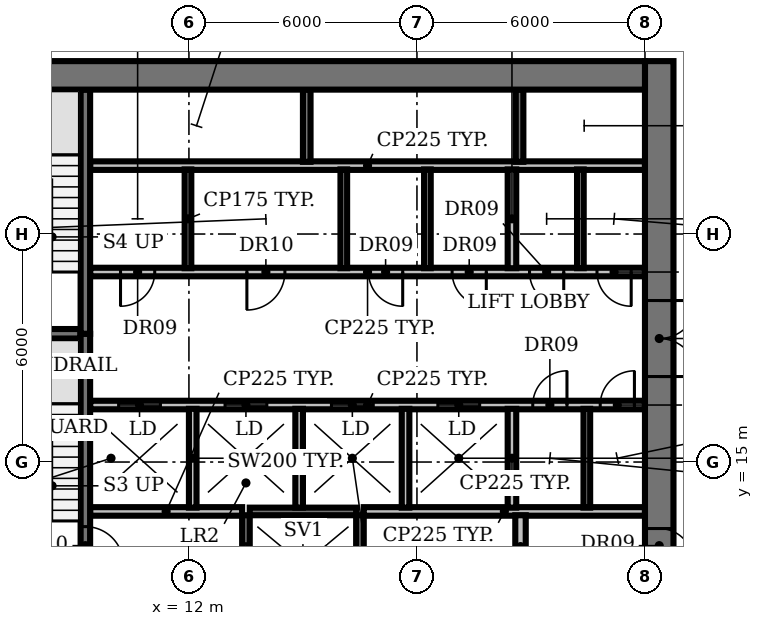
"""IFC4 building model, lengths in metres.
Left out: names, types, materials, properties, quantities, classifications, styles, units other than length and angle.
Written with IfcOpenShell. Run it as: python <this file> out.ifc"""

import sys

from ifc_helpers import new_model, si_unit, direction, frame, frame_2d, origin, place, context, subcontext, project, spatial, rectangle, extrude, element, fill, save


model = new_model("IFC4")
c1 = context("Model", 3, precision=1e-05, world=origin(), true_north=direction((0.0, 1.0)))
c2 = subcontext(c1, "Body", "Model", "MODEL_VIEW")
j1 = project(units=[si_unit("LENGTHUNIT", "METRE"), si_unit("PLANEANGLEUNIT", "RADIAN")], contexts=[c1])
p1 = place(None, origin())
s1 = spatial("IfcSite", under=j1, at=p1, CompositionType="ELEMENT")
p2 = place(p1, origin())
s2 = spatial("IfcBuilding", under=s1, at=p2, CompositionType="ELEMENT")
p3 = place(p2, frame((0.0, 0.0, 100.4)))
s3 = spatial("IfcBuildingStorey", under=s2, at=p3, CompositionType="ELEMENT", Elevation=100.4)
p4 = place(p3, frame((9.4, 13.7, 0.0), z_axis=(0.0, 0.0, 1.0), x_axis=(1.0, 0.0, 0.0)))
e1 = element("IfcWall", 1, at=p4, inside=s3, PredefinedType="PARTITIONING", context=c2, shape_type="SweptSolid", body=[
    extrude(rectangle(XDim=4.0, YDim=0.225, at=frame_2d((2.0, 0.0))), origin(), (0.0, 0.0, 1.0), 3.85),
])
p5 = place(p3, frame((13.6, 13.7, 0.0), z_axis=(0.0, 0.0, 1.0), x_axis=(1.0, 0.0, 0.0)))
e2 = element("IfcWall", 2, at=p5, inside=s3, PredefinedType="SHEAR", context=c2, shape_type="SweptSolid", body=[
    extrude(rectangle(XDim=2.8, YDim=0.2, at=frame_2d((1.4, 0.0))), origin(), (0.0, 0.0, 1.0), 3.85),
])
p6 = place(p3, frame((16.6, 13.7, 0.0), z_axis=(0.0, 0.0, 1.0), x_axis=(1.0, 0.0, 0.0)))
e3 = element("IfcWall", 3, at=p6, inside=s3, PredefinedType="PARTITIONING", context=c2, shape_type="SweptSolid", body=[
    extrude(rectangle(XDim=7.4, YDim=0.225, at=frame_2d((3.7, 0.0))), origin(), (0.0, 0.0, 1.0), 3.85),
])
p7 = place(p3, frame((9.4, 16.5, 0.0), z_axis=(0.0, 0.0, 1.0), x_axis=(1.0, 0.0, 0.0)))
e4 = element("IfcWall", 4, at=p7, inside=s3, PredefinedType="PARTITIONING", context=c2, shape_type="SweptSolid", body=[
    extrude(rectangle(XDim=14.6, YDim=0.225, at=frame_2d((7.3, 0.0))), origin(), (0.0, 0.0, 1.0), 3.85),
])
p8 = place(p7, frame((0.75, 0.0, 0.0)))
e5 = element("IfcOpeningElement", 5, at=p8, cuts=e4, PredefinedType="OPENING", context=c2, shape_type="SweptSolid", body=[
    extrude(rectangle(XDim=1.1, YDim=2.1, at=frame_2d((0.55, 1.05))), frame((0.0, 0.123, 0.0), z_axis=(0.0, -1.0, 0.0), x_axis=(1.0, 0.0, 0.0)), (0.0, 0.0, 1.0), 0.245),
])
p9 = place(p7, frame((3.55, 0.0, 0.0)))
e6 = element("IfcOpeningElement", 6, at=p9, cuts=e4, PredefinedType="OPENING", context=c2, shape_type="SweptSolid", body=[
    extrude(rectangle(XDim=1.1, YDim=2.1, at=frame_2d((0.55, 1.05))), frame((0.0, 0.123, 0.0), z_axis=(0.0, -1.0, 0.0), x_axis=(1.0, 0.0, 0.0)), (0.0, 0.0, 1.0), 0.245),
])
p10 = place(p7, frame((6.35, 0.0, 0.0)))
e7 = element("IfcOpeningElement", 7, at=p10, cuts=e4, PredefinedType="OPENING", context=c2, shape_type="SweptSolid", body=[
    extrude(rectangle(XDim=1.1, YDim=2.1, at=frame_2d((0.55, 1.05))), frame((0.0, 0.123, 0.0), z_axis=(0.0, -1.0, 0.0), x_axis=(1.0, 0.0, 0.0)), (0.0, 0.0, 1.0), 0.245),
])
p11 = place(p7, frame((9.15, 0.0, 0.0)))
e8 = element("IfcOpeningElement", 8, at=p11, cuts=e4, PredefinedType="OPENING", context=c2, shape_type="SweptSolid", body=[
    extrude(rectangle(XDim=1.1, YDim=2.1, at=frame_2d((0.55, 1.05))), frame((0.0, 0.123, 0.0), z_axis=(0.0, -1.0, 0.0), x_axis=(1.0, 0.0, 0.0)), (0.0, 0.0, 1.0), 0.245),
])
p12 = place(p7, frame((11.647, 0.0, 0.0)))
e9 = element("IfcOpeningElement", 9, at=p12, cuts=e4, PredefinedType="OPENING", context=c2, shape_type="SweptSolid", body=[
    extrude(rectangle(XDim=0.9, YDim=2.1, at=frame_2d((0.45, 1.05))), frame((0.0, 0.123, 0.0), z_axis=(0.0, -1.0, 0.0), x_axis=(1.0, 0.0, 0.0)), (0.0, 0.0, 1.0), 0.245),
])
p13 = place(p7, frame((13.423, 0.0, 0.0)))
e10 = element("IfcOpeningElement", 10, at=p13, cuts=e4, PredefinedType="OPENING", context=c2, shape_type="SweptSolid", body=[
    extrude(rectangle(XDim=0.9, YDim=2.1, at=frame_2d((0.45, 1.05))), frame((0.0, 0.123, 0.0), z_axis=(0.0, -1.0, 0.0), x_axis=(1.0, 0.0, 0.0)), (0.0, 0.0, 1.0), 0.245),
])
p14 = place(p3, frame((6.0, 18.375, 0.0), z_axis=(0.0, 0.0, 1.0), x_axis=(1.0, 0.0, 0.0)))
e11 = element("IfcWall", 11, at=p14, inside=s3, PredefinedType="SHEAR", context=c2, shape_type="SweptSolid", body=[
    extrude(rectangle(XDim=3.15, YDim=0.25, at=frame_2d((1.575, 0.0))), origin(), (0.0, 0.0, 1.0), 3.85),
])
p15 = place(p3, frame((24.0, 20.0, 0.0), z_axis=(0.0, 0.0, 1.0), x_axis=(-1.0, 0.0, 0.0)))
e12 = element("IfcWall", 12, at=p15, inside=s3, PredefinedType="PARTITIONING", context=c2, shape_type="SweptSolid", body=[
    extrude(rectangle(XDim=14.6, YDim=0.225, at=frame_2d((7.3, 0.0))), origin(), (0.0, 0.0, 1.0), 3.85),
])
p16 = place(p15, frame((12.9, 0.0, 0.0)))
e13 = element("IfcOpeningElement", 13, at=p16, cuts=e12, PredefinedType="OPENING", context=c2, shape_type="SweptSolid", body=[
    extrude(rectangle(XDim=0.9, YDim=2.1, at=frame_2d((0.45, 1.05))), frame((0.0, 0.123, 0.0), z_axis=(0.0, -1.0, 0.0), x_axis=(1.0, 0.0, 0.0)), (0.0, 0.0, 1.0), 0.245),
])
p17 = place(p15, frame((9.475, 0.0, 0.0)))
e14 = element("IfcOpeningElement", 14, at=p17, cuts=e12, PredefinedType="OPENING", context=c2, shape_type="SweptSolid", body=[
    extrude(rectangle(XDim=1.0, YDim=2.1, at=frame_2d((0.5, 1.05))), frame((0.0, 0.123, 0.0), z_axis=(0.0, -1.0, 0.0), x_axis=(1.0, 0.0, 0.0)), (0.0, 0.0, 1.0), 0.245),
])
p18 = place(p15, frame((6.375, 0.0, 0.0)))
e15 = element("IfcOpeningElement", 15, at=p18, cuts=e12, PredefinedType="OPENING", context=c2, shape_type="SweptSolid", body=[
    extrude(rectangle(XDim=0.9, YDim=2.1, at=frame_2d((0.45, 1.05))), frame((0.0, 0.123, 0.0), z_axis=(0.0, -1.0, 0.0), x_axis=(1.0, 0.0, 0.0)), (0.0, 0.0, 1.0), 0.245),
])
p19 = place(p15, frame((4.175, 0.0, 0.0)))
e16 = element("IfcOpeningElement", 16, at=p19, cuts=e12, PredefinedType="OPENING", context=c2, shape_type="SweptSolid", body=[
    extrude(rectangle(XDim=0.9, YDim=2.1, at=frame_2d((0.45, 1.05))), frame((0.0, 0.123, 0.0), z_axis=(0.0, -1.0, 0.0), x_axis=(1.0, 0.0, 0.0)), (0.0, 0.0, 1.0), 0.245),
])
p20 = place(p15, frame((2.137, 0.0, 0.0)))
e17 = element("IfcOpeningElement", 17, at=p20, cuts=e12, PredefinedType="OPENING", context=c2, shape_type="SweptSolid", body=[
    extrude(rectangle(XDim=0.9, YDim=2.1, at=frame_2d((0.45, 1.05))), frame((0.0, 0.123, 0.0), z_axis=(0.0, -1.0, 0.0), x_axis=(1.0, 0.0, 0.0)), (0.0, 0.0, 1.0), 0.245),
])
p21 = place(p15, frame((0.363, 0.0, 0.0)))
e18 = element("IfcOpeningElement", 18, at=p21, cuts=e12, PredefinedType="OPENING", context=c2, shape_type="SweptSolid", body=[
    extrude(rectangle(XDim=0.9, YDim=2.1, at=frame_2d((0.45, 1.05))), frame((0.0, 0.123, 0.0), z_axis=(0.0, -1.0, 0.0), x_axis=(1.0, 0.0, 0.0)), (0.0, 0.0, 1.0), 0.245),
])
p22 = place(p3, frame((9.4, 22.8, 0.0), z_axis=(0.0, 0.0, 1.0), x_axis=(1.0, 0.0, 0.0)))
e19 = element("IfcWall", 19, at=p22, inside=s3, PredefinedType="PARTITIONING", context=c2, shape_type="SweptSolid", body=[
    extrude(rectangle(XDim=14.6, YDim=0.225, at=frame_2d((7.3, 0.0))), origin(), (0.0, 0.0, 1.0), 3.85),
])
p23 = place(p3, frame((9.275, 18.375, 0.0), z_axis=(0.0, 0.0, 1.0), x_axis=(0.0, -1.0, 0.0)))
e20 = element("IfcWall", 20, at=p23, inside=s3, PredefinedType="SHEAR", context=c2, shape_type="SweptSolid", body=[
    extrude(rectangle(XDim=6.55, YDim=0.25, at=frame_2d((3.275, 0.0))), origin(), (0.0, 0.0, 1.0), 3.85),
])
p24 = place(p23, frame((5.075, 0.0, 0.0)))
e21 = element("IfcOpeningElement", 21, at=p24, cuts=e20, PredefinedType="OPENING", context=c2, shape_type="SweptSolid", body=[
    extrude(rectangle(XDim=1.0, YDim=2.1, at=frame_2d((0.5, 1.05))), frame((0.0, 0.135, 0.0), z_axis=(0.0, -1.0, 0.0), x_axis=(1.0, 0.0, 0.0)), (0.0, 0.0, 1.0), 0.27),
])
p25 = place(p3, frame((9.275, 18.375, 0.0), z_axis=(0.0, 0.0, 1.0), x_axis=(0.0, 1.0, 0.0)))
e22 = element("IfcWall", 22, at=p25, inside=s3, PredefinedType="SHEAR", context=c2, shape_type="SweptSolid", body=[
    extrude(rectangle(XDim=6.425, YDim=0.25, at=frame_2d((3.212, 0.0))), origin(), (0.0, 0.0, 1.0), 3.85),
])
p26 = place(p3, frame((11.975, 20.1, 0.0), z_axis=(0.0, 0.0, 1.0), x_axis=(0.0, 1.0, 0.0)))
e23 = element("IfcWall", 23, at=p26, inside=s3, PredefinedType="PARTITIONING", context=c2, shape_type="SweptSolid", body=[
    extrude(rectangle(XDim=2.6, YDim=0.175, at=frame_2d((1.3, 0.0))), origin(), (0.0, 0.0, 1.0), 3.85),
])
p27 = place(p3, frame((12.1, 13.8, 0.0), z_axis=(0.0, 0.0, 1.0), x_axis=(0.0, 1.0, 0.0)))
e24 = element("IfcWall", 24, at=p27, inside=s3, PredefinedType="SOLIDWALL", context=c2, shape_type="SweptSolid", body=[
    extrude(rectangle(XDim=2.6, YDim=0.2, at=frame_2d((1.3, 0.0))), origin(), (0.0, 0.0, 1.0), 3.85),
])
p28 = place(p3, frame((13.5, 5.4, 0.0), z_axis=(0.0, 0.0, 1.0), x_axis=(0.0, 1.0, 0.0)))
e25 = element("IfcWall", 25, at=p28, inside=s3, PredefinedType="SHEAR", context=c2, shape_type="SweptSolid", body=[
    extrude(rectangle(XDim=8.2, YDim=0.2, at=frame_2d((4.1, 0.0))), origin(), (0.0, 0.0, 1.0), 3.85),
])
p29 = place(p28, frame((0.75, 0.0, 0.0)))
e26 = element("IfcOpeningElement", 26, at=p29, cuts=e25, PredefinedType="OPENING", context=c2, shape_type="SweptSolid", body=[
    extrude(rectangle(XDim=1.1, YDim=2.1, at=frame_2d((0.55, 1.05))), frame((0.0, 0.11, 0.0), z_axis=(0.0, -1.0, 0.0), x_axis=(1.0, 0.0, 0.0)), (0.0, 0.0, 1.0), 0.22),
])
p30 = place(p28, frame((3.55, 0.0, 0.0)))
e27 = element("IfcOpeningElement", 27, at=p30, cuts=e25, PredefinedType="OPENING", context=c2, shape_type="SweptSolid", body=[
    extrude(rectangle(XDim=1.1, YDim=2.1, at=frame_2d((0.55, 1.05))), frame((0.0, 0.11, 0.0), z_axis=(0.0, -1.0, 0.0), x_axis=(1.0, 0.0, 0.0)), (0.0, 0.0, 1.0), 0.22),
])
p31 = place(p28, frame((6.35, 0.0, 0.0)))
e28 = element("IfcOpeningElement", 28, at=p31, cuts=e25, PredefinedType="OPENING", context=c2, shape_type="SweptSolid", body=[
    extrude(rectangle(XDim=1.1, YDim=2.1, at=frame_2d((0.55, 1.05))), frame((0.0, 0.11, 0.0), z_axis=(0.0, -1.0, 0.0), x_axis=(1.0, 0.0, 0.0)), (0.0, 0.0, 1.0), 0.22),
])
p32 = place(p3, frame((14.9, 13.8, 0.0), z_axis=(0.0, 0.0, 1.0), x_axis=(0.0, 1.0, 0.0)))
e29 = element("IfcWall", 29, at=p32, inside=s3, PredefinedType="SOLIDWALL", context=c2, shape_type="SweptSolid", body=[
    extrude(rectangle(XDim=2.6, YDim=0.2, at=frame_2d((1.3, 0.0))), origin(), (0.0, 0.0, 1.0), 3.85),
])
p33 = place(p3, frame((15.1, 22.9, 0.0), z_axis=(0.0, 0.0, 1.0), x_axis=(0.0, 1.0, 0.0)))
e30 = element("IfcWall", 30, at=p33, inside=s3, PredefinedType="SHEAR", context=c2, shape_type="SweptSolid", body=[
    extrude(rectangle(XDim=1.9, YDim=0.2, at=frame_2d((0.95, 0.0))), origin(), (0.0, 0.0, 1.0), 3.85),
])
p34 = place(p3, frame((16.075, 20.1, 0.0), z_axis=(0.0, 0.0, 1.0), x_axis=(0.0, 1.0, 0.0)))
e31 = element("IfcWall", 31, at=p34, inside=s3, PredefinedType="PARTITIONING", context=c2, shape_type="SweptSolid", body=[
    extrude(rectangle(XDim=2.6, YDim=0.175, at=frame_2d((1.3, 0.0))), origin(), (0.0, 0.0, 1.0), 3.85),
])
p35 = place(p3, frame((16.5, 5.4, 0.0), z_axis=(0.0, 0.0, 1.0), x_axis=(0.0, 1.0, 0.0)))
e32 = element("IfcWall", 32, at=p35, inside=s3, PredefinedType="SHEAR", context=c2, shape_type="SweptSolid", body=[
    extrude(rectangle(XDim=8.2, YDim=0.2, at=frame_2d((4.1, 0.0))), origin(), (0.0, 0.0, 1.0), 3.85),
])
p36 = place(p3, frame((17.7, 13.8, 0.0), z_axis=(0.0, 0.0, 1.0), x_axis=(0.0, 1.0, 0.0)))
e33 = element("IfcWall", 33, at=p36, inside=s3, PredefinedType="SOLIDWALL", context=c2, shape_type="SweptSolid", body=[
    extrude(rectangle(XDim=2.6, YDim=0.2, at=frame_2d((1.3, 0.0))), origin(), (0.0, 0.0, 1.0), 3.85),
])
p37 = place(p3, frame((18.275, 20.1, 0.0), z_axis=(0.0, 0.0, 1.0), x_axis=(0.0, 1.0, 0.0)))
e34 = element("IfcWall", 34, at=p37, inside=s3, PredefinedType="PARTITIONING", context=c2, shape_type="SweptSolid", body=[
    extrude(rectangle(XDim=2.6, YDim=0.175, at=frame_2d((1.3, 0.0))), origin(), (0.0, 0.0, 1.0), 3.85),
])
for number, where, z_axis, x_axis in (
    (35, (20.5, 13.8, 0.0), (0.0, 0.0, 1.0), (0.0, 1.0, 0.0)),
    (36, (20.5, 20.1, 0.0), (0.0, 0.0, 1.0), (0.0, 1.0, 0.0)),
):
    element("IfcWall", number, at=place(p3, frame(where, z_axis=z_axis, x_axis=x_axis)), inside=s3, PredefinedType="PARTITIONING", context=c2, shape_type="SweptSolid", body=[
        extrude(rectangle(XDim=2.6, YDim=0.225, at=frame_2d((1.3, 0.0))), origin(), (0.0, 0.0, 1.0), 3.85),
    ])
p38 = place(p3, frame((20.7, 22.9, 0.0), z_axis=(0.0, 0.0, 1.0), x_axis=(0.0, 1.0, 0.0)))
e37 = element("IfcWall", 37, at=p38, inside=s3, PredefinedType="SHEAR", context=c2, shape_type="SweptSolid", body=[
    extrude(rectangle(XDim=1.9, YDim=0.2, at=frame_2d((0.95, 0.0))), origin(), (0.0, 0.0, 1.0), 3.85),
])
p39 = place(p3, frame((20.725, 11.95, 0.0), z_axis=(0.0, 0.0, 1.0), x_axis=(0.0, 1.0, 0.0)))
e38 = element("IfcWall", 38, at=p39, inside=s3, PredefinedType="PARTITIONING", context=c2, shape_type="SweptSolid", body=[
    extrude(rectangle(XDim=1.65, YDim=0.275, at=frame_2d((0.825, 0.0))), origin(), (0.0, 0.0, 1.0), 3.85),
])
for number, where, z_axis, x_axis in (
    (39, (22.3, 20.1, 0.0), (0.0, 0.0, 1.0), (0.0, 1.0, 0.0)),
    (40, (22.47, 13.8, 0.0), (0.0, 0.0, 1.0), (0.0, 1.0, 0.0)),
):
    element("IfcWall", number, at=place(p3, frame(where, z_axis=z_axis, x_axis=x_axis)), inside=s3, PredefinedType="PARTITIONING", context=c2, shape_type="SweptSolid", body=[
        extrude(rectangle(XDim=2.6, YDim=0.175, at=frame_2d((1.3, 0.0))), origin(), (0.0, 0.0, 1.0), 3.85),
    ])
p40 = place(p3, frame((24.375, 25.55, 0.0), z_axis=(0.0, 0.0, 1.0), x_axis=(0.0, -1.0, 0.0)))
e41 = element("IfcWall", 41, at=p40, inside=s3, PredefinedType="SHEAR", context=c2, shape_type="SweptSolid", body=[
    extrude(rectangle(XDim=21.13, YDim=0.75, at=frame_2d((10.565, 0.0))), origin(), (0.0, 0.0, 1.0), 3.85),
])
p41 = place(p40, frame((18.4, 0.0, 0.0)))
e42 = element("IfcOpeningElement", 42, at=p41, cuts=e41, PredefinedType="OPENING", context=c2, shape_type="SweptSolid", body=[
    extrude(rectangle(XDim=1.5, YDim=2.1, at=frame_2d((0.75, 1.05))), frame((0.0, 0.385, 0.0), z_axis=(0.0, -1.0, 0.0), x_axis=(1.0, 0.0, 0.0)), (0.0, 0.0, 1.0), 0.77),
])
p42 = place(p40, frame((12.3, 0.0, 0.0)))
e43 = element("IfcOpeningElement", 43, at=p42, cuts=e41, PredefinedType="OPENING", context=c2, shape_type="SweptSolid", body=[
    extrude(rectangle(XDim=0.9, YDim=2.1, at=frame_2d((0.45, 1.05))), frame((0.0, 0.385, 0.0), z_axis=(0.0, -1.0, 0.0), x_axis=(1.0, 0.0, 0.0)), (0.0, 0.0, 1.0), 0.77),
])
p43 = place(p40, frame((6.3, 0.0, 0.0)))
e44 = element("IfcOpeningElement", 44, at=p43, cuts=e41, PredefinedType="OPENING", context=c2, shape_type="SweptSolid", body=[
    extrude(rectangle(XDim=2.0, YDim=2.1, at=frame_2d((1.0, 1.05))), frame((0.0, 0.385, 0.0), z_axis=(0.0, -1.0, 0.0), x_axis=(1.0, 0.0, 0.0)), (0.0, 0.0, 1.0), 0.77),
])
p44 = place(p3, frame((6.0, 25.175, 0.0), z_axis=(0.0, 0.0, 1.0), x_axis=(1.0, 0.0, 0.0)))
e45 = element("IfcWall", 45, at=p44, inside=s3, PredefinedType="SHEAR", context=c2, shape_type="SweptSolid", body=[
    extrude(rectangle(XDim=18.0, YDim=0.75, at=frame_2d((9.0, 0.0))), origin(), (0.0, 0.0, 1.0), 3.85),
])
p45 = place(p8, origin())
e46 = element("IfcDoor", 46, at=p45, inside=s3, OperationType="DOUBLE_DOOR_SLIDING", PredefinedType="DOOR", context=c2, shape_type="SweptSolid", body=[
    extrude(rectangle(XDim=1.1, YDim=2.1, at=frame_2d((0.55, 1.05))), frame((0.0, 0.025, 0.0), z_axis=(0.0, -1.0, 0.0), x_axis=(1.0, 0.0, 0.0)), (0.0, 0.0, 1.0), 0.05),
])
fill(e5, e46)
p46 = place(p9, origin())
e47 = element("IfcDoor", 47, at=p46, inside=s3, OperationType="DOUBLE_DOOR_SLIDING", PredefinedType="DOOR", context=c2, shape_type="SweptSolid", body=[
    extrude(rectangle(XDim=1.1, YDim=2.1, at=frame_2d((0.55, 1.05))), frame((0.0, 0.025, 0.0), z_axis=(0.0, -1.0, 0.0), x_axis=(1.0, 0.0, 0.0)), (0.0, 0.0, 1.0), 0.05),
])
fill(e6, e47)
p47 = place(p10, origin())
e48 = element("IfcDoor", 48, at=p47, inside=s3, OperationType="DOUBLE_DOOR_SLIDING", PredefinedType="DOOR", context=c2, shape_type="SweptSolid", body=[
    extrude(rectangle(XDim=1.1, YDim=2.1, at=frame_2d((0.55, 1.05))), frame((0.0, 0.025, 0.0), z_axis=(0.0, -1.0, 0.0), x_axis=(1.0, 0.0, 0.0)), (0.0, 0.0, 1.0), 0.05),
])
fill(e7, e48)
p48 = place(p11, origin())
e49 = element("IfcDoor", 49, at=p48, inside=s3, OperationType="DOUBLE_DOOR_SLIDING", PredefinedType="DOOR", context=c2, shape_type="SweptSolid", body=[
    extrude(rectangle(XDim=1.1, YDim=2.1, at=frame_2d((0.55, 1.05))), frame((0.0, 0.025, 0.0), z_axis=(0.0, -1.0, 0.0), x_axis=(1.0, 0.0, 0.0)), (0.0, 0.0, 1.0), 0.05),
])
fill(e8, e49)
p49 = place(p12, origin())
e50 = element("IfcDoor", 50, at=p49, inside=s3, OperationType="SINGLE_SWING_RIGHT", PredefinedType="DOOR", context=c2, shape_type="SweptSolid", body=[
    extrude(rectangle(XDim=0.9, YDim=2.1, at=frame_2d((0.45, 1.05))), frame((0.0, 0.025, 0.0), z_axis=(0.0, -1.0, 0.0), x_axis=(1.0, 0.0, 0.0)), (0.0, 0.0, 1.0), 0.05),
])
fill(e9, e50)
p50 = place(p13, origin())
e51 = element("IfcDoor", 51, at=p50, inside=s3, OperationType="SINGLE_SWING_RIGHT", PredefinedType="DOOR", context=c2, shape_type="SweptSolid", body=[
    extrude(rectangle(XDim=0.9, YDim=2.1, at=frame_2d((0.45, 1.05))), frame((0.0, 0.025, 0.0), z_axis=(0.0, -1.0, 0.0), x_axis=(1.0, 0.0, 0.0)), (0.0, 0.0, 1.0), 0.05),
])
fill(e10, e51)
p51 = place(p16, origin())
e52 = element("IfcDoor", 52, at=p51, inside=s3, OperationType="SINGLE_SWING_RIGHT", PredefinedType="DOOR", context=c2, shape_type="SweptSolid", body=[
    extrude(rectangle(XDim=0.9, YDim=2.1, at=frame_2d((0.45, 1.05))), frame((0.0, 0.025, 0.0), z_axis=(0.0, -1.0, 0.0), x_axis=(1.0, 0.0, 0.0)), (0.0, 0.0, 1.0), 0.05),
])
fill(e13, e52)
p52 = place(p17, origin())
e53 = element("IfcDoor", 53, at=p52, inside=s3, OperationType="SINGLE_SWING_RIGHT", PredefinedType="DOOR", context=c2, shape_type="SweptSolid", body=[
    extrude(rectangle(XDim=1.0, YDim=2.1, at=frame_2d((0.5, 1.05))), frame((0.0, 0.025, 0.0), z_axis=(0.0, -1.0, 0.0), x_axis=(1.0, 0.0, 0.0)), (0.0, 0.0, 1.0), 0.05),
])
fill(e14, e53)
p53 = place(p18, origin())
e54 = element("IfcDoor", 54, at=p53, inside=s3, OperationType="SINGLE_SWING_LEFT", PredefinedType="DOOR", context=c2, shape_type="SweptSolid", body=[
    extrude(rectangle(XDim=0.9, YDim=2.1, at=frame_2d((0.45, 1.05))), frame((0.0, 0.025, 0.0), z_axis=(0.0, -1.0, 0.0), x_axis=(1.0, 0.0, 0.0)), (0.0, 0.0, 1.0), 0.05),
])
fill(e15, e54)
p54 = place(p19, origin())
e55 = element("IfcDoor", 55, at=p54, inside=s3, OperationType="SINGLE_SWING_LEFT", PredefinedType="DOOR", context=c2, shape_type="SweptSolid", body=[
    extrude(rectangle(XDim=0.9, YDim=2.1, at=frame_2d((0.45, 1.05))), frame((0.0, 0.025, 0.0), z_axis=(0.0, -1.0, 0.0), x_axis=(1.0, 0.0, 0.0)), (0.0, 0.0, 1.0), 0.05),
])
fill(e16, e55)
p55 = place(p20, origin())
e56 = element("IfcDoor", 56, at=p55, inside=s3, OperationType="SINGLE_SWING_LEFT", PredefinedType="DOOR", context=c2, shape_type="SweptSolid", body=[
    extrude(rectangle(XDim=0.9, YDim=2.1, at=frame_2d((0.45, 1.05))), frame((0.0, 0.025, 0.0), z_axis=(0.0, -1.0, 0.0), x_axis=(1.0, 0.0, 0.0)), (0.0, 0.0, 1.0), 0.05),
])
fill(e17, e56)
p56 = place(p21, origin())
e57 = element("IfcDoor", 57, at=p56, inside=s3, OperationType="SINGLE_SWING_LEFT", PredefinedType="DOOR", context=c2, shape_type="SweptSolid", body=[
    extrude(rectangle(XDim=0.9, YDim=2.1, at=frame_2d((0.45, 1.05))), frame((0.0, 0.025, 0.0), z_axis=(0.0, -1.0, 0.0), x_axis=(1.0, 0.0, 0.0)), (0.0, 0.0, 1.0), 0.05),
])
fill(e18, e57)
p57 = place(p24, origin())
e58 = element("IfcDoor", 58, at=p57, inside=s3, OperationType="SINGLE_SWING_RIGHT", PredefinedType="DOOR", context=c2, shape_type="SweptSolid", body=[
    extrude(rectangle(XDim=1.0, YDim=2.1, at=frame_2d((0.5, 1.05))), frame((0.0, 0.025, 0.0), z_axis=(0.0, -1.0, 0.0), x_axis=(1.0, 0.0, 0.0)), (0.0, 0.0, 1.0), 0.05),
])
fill(e21, e58)
p58 = place(p31, origin())
e59 = element("IfcDoor", 59, at=p58, inside=s3, OperationType="DOUBLE_DOOR_SLIDING", PredefinedType="DOOR", context=c2, shape_type="SweptSolid", body=[
    extrude(rectangle(XDim=1.1, YDim=2.1, at=frame_2d((0.55, 1.05))), frame((0.0, 0.025, 0.0), z_axis=(0.0, -1.0, 0.0), x_axis=(1.0, 0.0, 0.0)), (0.0, 0.0, 1.0), 0.05),
])
fill(e28, e59)
p59 = place(p42, origin())
e60 = element("IfcDoor", 60, at=p59, inside=s3, OperationType="SINGLE_SWING_RIGHT", PredefinedType="DOOR", context=c2, shape_type="SweptSolid", body=[
    extrude(rectangle(XDim=0.9, YDim=2.1, at=frame_2d((0.45, 1.05))), frame((0.0, -0.315, 0.0), z_axis=(0.0, -1.0, 0.0), x_axis=(1.0, 0.0, 0.0)), (0.0, 0.0, 1.0), 0.05),
])
fill(e43, e60)
p60 = place(p43, origin())
e61 = element("IfcDoor", 61, at=p60, inside=s3, OperationType="DOUBLE_DOOR_SINGLE_SWING", PredefinedType="DOOR", context=c2, shape_type="SweptSolid", body=[
    extrude(rectangle(XDim=2.0, YDim=2.1, at=frame_2d((1.0, 1.05))), frame((0.0, 0.025, 0.0), z_axis=(0.0, -1.0, 0.0), x_axis=(1.0, 0.0, 0.0)), (0.0, 0.0, 1.0), 0.05),
])
fill(e44, e61)
save(model, sys.argv[1])
